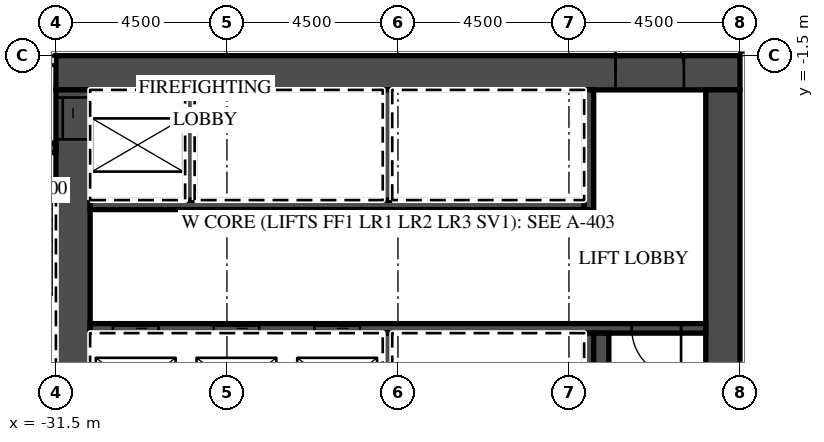
"""IFC4 building model, lengths in metres.
Left out: names, types, materials, properties, quantities, classifications, styles, units other than length and angle.
Written with IfcOpenShell. Run it as: python <this file> out.ifc"""

import sys

from ifc_helpers import new_model, si_unit, direction, frame, frame_2d, origin, place, context, subcontext, project, spatial, rectangle, extrude, element, fill, save


model = new_model("IFC4")
c1 = context("Model", 3, precision=1e-05, world=origin(), true_north=direction((0.0, 1.0)))
c2 = subcontext(c1, "Body", "Model", "MODEL_VIEW")
j1 = project(units=[si_unit("LENGTHUNIT", "METRE"), si_unit("PLANEANGLEUNIT", "RADIAN")], contexts=[c1])
p1 = place(None, origin())
s1 = spatial("IfcSite", under=j1, at=p1, CompositionType="ELEMENT")
p2 = place(p1, origin())
s2 = spatial("IfcBuilding", under=s1, at=p2, CompositionType="ELEMENT")
p3 = place(p2, frame((0.0, 0.0, 93.0)))
s3 = spatial("IfcBuildingStorey", under=s2, at=p3, CompositionType="ELEMENT", Elevation=93.0)
p4 = place(p3, frame((-13.5, -1.3, 0.0), z_axis=(0.0, 0.0, 1.0), x_axis=(1.0, 0.0, 0.0)))
e1 = element("IfcWall", 1, at=p4, inside=s3, PredefinedType="PARTITIONING", context=c2, shape_type="SweptSolid", body=[
    extrude(rectangle(XDim=58.05, YDim=0.2, at=frame_2d((29.025, 0.0))), origin(), (0.0, 0.0, 1.0), 3.02),
])
p5 = place(p4, frame((0.575, 0.0, 0.0)))
e2 = element("IfcOpeningElement", 2, at=p5, cuts=e1, PredefinedType="OPENING", context=c2, shape_type="SweptSolid", body=[
    extrude(rectangle(XDim=1.0, YDim=2.1, at=frame_2d((0.5, 1.05))), frame((0.0, 0.11, 0.0), z_axis=(0.0, -1.0, 0.0), x_axis=(1.0, 0.0, 0.0)), (0.0, 0.0, 1.0), 0.22),
])
p6 = place(p4, frame((7.45, 0.0, 0.0)))
e3 = element("IfcOpeningElement", 3, at=p6, cuts=e1, PredefinedType="OPENING", context=c2, shape_type="SweptSolid", body=[
    extrude(rectangle(XDim=1.0, YDim=2.1, at=frame_2d((0.5, 1.05))), frame((0.0, 0.11, 0.0), z_axis=(0.0, -1.0, 0.0), x_axis=(1.0, 0.0, 0.0)), (0.0, 0.0, 1.0), 0.22),
])
p7 = place(p4, frame((11.925, 0.0, 0.0)))
e4 = element("IfcOpeningElement", 4, at=p7, cuts=e1, PredefinedType="OPENING", context=c2, shape_type="SweptSolid", body=[
    extrude(rectangle(XDim=1.0, YDim=2.1, at=frame_2d((0.5, 1.05))), frame((0.0, 0.11, 0.0), z_axis=(0.0, -1.0, 0.0), x_axis=(1.0, 0.0, 0.0)), (0.0, 0.0, 1.0), 0.22),
])
p8 = place(p4, frame((14.075, 0.0, 0.0)))
e5 = element("IfcOpeningElement", 5, at=p8, cuts=e1, PredefinedType="OPENING", context=c2, shape_type="SweptSolid", body=[
    extrude(rectangle(XDim=1.0, YDim=2.1, at=frame_2d((0.5, 1.05))), frame((0.0, 0.11, 0.0), z_axis=(0.0, -1.0, 0.0), x_axis=(1.0, 0.0, 0.0)), (0.0, 0.0, 1.0), 0.22),
])
p9 = place(p4, frame((20.925, 0.0, 0.0)))
e6 = element("IfcOpeningElement", 6, at=p9, cuts=e1, PredefinedType="OPENING", context=c2, shape_type="SweptSolid", body=[
    extrude(rectangle(XDim=1.0, YDim=2.1, at=frame_2d((0.5, 1.05))), frame((0.0, 0.11, 0.0), z_axis=(0.0, -1.0, 0.0), x_axis=(1.0, 0.0, 0.0)), (0.0, 0.0, 1.0), 0.22),
])
p10 = place(p4, frame((27.862, 0.0, 0.0)))
e7 = element("IfcOpeningElement", 7, at=p10, cuts=e1, PredefinedType="OPENING", context=c2, shape_type="SweptSolid", body=[
    extrude(rectangle(XDim=1.2, YDim=2.1, at=frame_2d((0.6, 1.05))), frame((0.0, 0.11, 0.0), z_axis=(0.0, -1.0, 0.0), x_axis=(1.0, 0.0, 0.0)), (0.0, 0.0, 1.0), 0.22),
])
p11 = place(p4, frame((33.938, 0.0, 0.0)))
e8 = element("IfcOpeningElement", 8, at=p11, cuts=e1, PredefinedType="OPENING", context=c2, shape_type="SweptSolid", body=[
    extrude(rectangle(XDim=1.2, YDim=2.1, at=frame_2d((0.6, 1.05))), frame((0.0, 0.11, 0.0), z_axis=(0.0, -1.0, 0.0), x_axis=(1.0, 0.0, 0.0)), (0.0, 0.0, 1.0), 0.22),
])
p12 = place(p4, frame((45.862, 0.0, 0.0)))
e9 = element("IfcOpeningElement", 9, at=p12, cuts=e1, PredefinedType="OPENING", context=c2, shape_type="SweptSolid", body=[
    extrude(rectangle(XDim=1.2, YDim=2.1, at=frame_2d((0.6, 1.05))), frame((0.0, 0.11, 0.0), z_axis=(0.0, -1.0, 0.0), x_axis=(1.0, 0.0, 0.0)), (0.0, 0.0, 1.0), 0.22),
])
p13 = place(p4, frame((52.425, 0.0, 0.0)))
e10 = element("IfcOpeningElement", 10, at=p13, cuts=e1, PredefinedType="OPENING", context=c2, shape_type="SweptSolid", body=[
    extrude(rectangle(XDim=1.0, YDim=2.1, at=frame_2d((0.5, 1.05))), frame((0.0, 0.11, 0.0), z_axis=(0.0, -1.0, 0.0), x_axis=(1.0, 0.0, 0.0)), (0.0, 0.0, 1.0), 0.22),
])
p14 = place(p4, frame((56.525, 0.0, 0.0)))
e11 = element("IfcOpeningElement", 11, at=p14, cuts=e1, PredefinedType="OPENING", context=c2, shape_type="SweptSolid", body=[
    extrude(rectangle(XDim=1.0, YDim=2.1, at=frame_2d((0.5, 1.05))), frame((0.0, 0.11, 0.0), z_axis=(0.0, -1.0, 0.0), x_axis=(1.0, 0.0, 0.0)), (0.0, 0.0, 1.0), 0.22),
])
p15 = place(p3, frame((-31.5, -1.95, 0.0), z_axis=(0.0, 0.0, 1.0), x_axis=(1.0, 0.0, 0.0)))
e12 = element("IfcWall", 12, at=p15, inside=s3, PredefinedType="SHEAR", context=c2, shape_type="SweptSolid", body=[
    extrude(rectangle(XDim=18.0, YDim=0.9, at=frame_2d((9.0, 0.0))), origin(), (0.0, 0.0, 1.0), 3.02),
])
p16 = place(p15, frame((14.725, 0.0, 0.0)))
e13 = element("IfcOpeningElement", 13, at=p16, cuts=e12, PredefinedType="OPENING", context=c2, shape_type="SweptSolid", body=[
    extrude(rectangle(XDim=1.8, YDim=2.1, at=frame_2d((0.9, 1.05))), frame((0.0, 0.46, 0.0), z_axis=(0.0, -1.0, 0.0), x_axis=(1.0, 0.0, 0.0)), (0.0, 0.0, 1.0), 0.92),
])
p17 = place(p3, frame((-31.05, -15.2, 0.0), z_axis=(0.0, 0.0, 1.0), x_axis=(0.0, 1.0, 0.0)))
e14 = element("IfcWall", 14, at=p17, inside=s3, PredefinedType="SHEAR", context=c2, shape_type="SweptSolid", body=[
    extrude(rectangle(XDim=12.8, YDim=0.9, at=frame_2d((6.4, 0.0))), origin(), (0.0, 0.0, 1.0), 3.02),
])
p18 = place(p17, frame((11.5, 0.0, 0.0)))
e15 = element("IfcOpeningElement", 15, at=p18, cuts=e14, PredefinedType="OPENING", context=c2, shape_type="SweptSolid", body=[
    extrude(rectangle(XDim=1.1, YDim=2.1, at=frame_2d((0.55, 1.05))), frame((0.0, 0.46, 0.0), z_axis=(0.0, -1.0, 0.0), x_axis=(1.0, 0.0, 0.0)), (0.0, 0.0, 1.0), 0.92),
])
p19 = place(p3, frame((-13.95, -14.6, 0.0), z_axis=(0.0, 0.0, 1.0), x_axis=(0.0, 1.0, 0.0)))
e16 = element("IfcWall", 16, at=p19, inside=s3, PredefinedType="SHEAR", context=c2, shape_type="SweptSolid", body=[
    extrude(rectangle(XDim=12.2, YDim=0.9, at=frame_2d((6.1, 0.0))), origin(), (0.0, 0.0, 1.0), 3.02),
])
p20 = place(p3, frame((-30.6, -5.425, 0.0), z_axis=(0.0, 0.0, 1.0), x_axis=(1.0, 0.0, 0.0)))
e17 = element("IfcWall", 17, at=p20, inside=s3, PredefinedType="SHEAR", context=c2, shape_type="SweptSolid", body=[
    extrude(rectangle(XDim=13.0, YDim=0.25, at=frame_2d((6.5, 0.0))), origin(), (0.0, 0.0, 1.0), 3.02),
])
p21 = place(p3, frame((-17.475, -5.55, 0.0), z_axis=(0.0, 0.0, 1.0), x_axis=(0.0, 1.0, 0.0)))
e18 = element("IfcWall", 18, at=p21, inside=s3, PredefinedType="SHEAR", context=c2, shape_type="SweptSolid", body=[
    extrude(rectangle(XDim=3.15, YDim=0.25, at=frame_2d((1.575, 0.0))), origin(), (0.0, 0.0, 1.0), 3.02),
])
for number, where, z_axis, x_axis in (
    (19, (-27.975, -5.3, 0.0), (0.0, 0.0, 1.0), (0.0, 1.0, 0.0)),
    (20, (-22.775, -5.3, 0.0), (0.0, 0.0, 1.0), (0.0, 1.0, 0.0)),
):
    element("IfcWall", number, at=place(p3, frame(where, z_axis=z_axis, x_axis=x_axis)), inside=s3, PredefinedType="SHEAR", context=c2, shape_type="SweptSolid", body=[
        extrude(rectangle(XDim=2.9, YDim=0.25, at=frame_2d((1.45, 0.0))), origin(), (0.0, 0.0, 1.0), 3.02),
    ])
p22 = place(p3, frame((-30.6, -8.675, 0.0), z_axis=(0.0, 0.0, 1.0), x_axis=(1.0, 0.0, 0.0)))
e21 = element("IfcWall", 21, at=p22, inside=s3, PredefinedType="SHEAR", context=c2, shape_type="SweptSolid", body=[
    extrude(rectangle(XDim=16.2, YDim=0.25, at=frame_2d((8.1, 0.0))), origin(), (0.0, 0.0, 1.0), 3.02),
])
p23 = place(p22, frame((0.6, 0.0, 0.0)))
e22 = element("IfcOpeningElement", 22, at=p23, cuts=e21, PredefinedType="OPENING", context=c2, shape_type="SweptSolid", body=[
    extrude(rectangle(XDim=1.2, YDim=2.1, at=frame_2d((0.6, 1.05))), frame((0.0, 0.135, 0.0), z_axis=(0.0, -1.0, 0.0), x_axis=(1.0, 0.0, 0.0)), (0.0, 0.0, 1.0), 0.27),
])
p24 = place(p22, frame((3.25, 0.0, 0.0)))
e23 = element("IfcOpeningElement", 23, at=p24, cuts=e21, PredefinedType="OPENING", context=c2, shape_type="SweptSolid", body=[
    extrude(rectangle(XDim=1.2, YDim=2.1, at=frame_2d((0.6, 1.05))), frame((0.0, 0.135, 0.0), z_axis=(0.0, -1.0, 0.0), x_axis=(1.0, 0.0, 0.0)), (0.0, 0.0, 1.0), 0.27),
])
p25 = place(p22, frame((5.9, 0.0, 0.0)))
e24 = element("IfcOpeningElement", 24, at=p25, cuts=e21, PredefinedType="OPENING", context=c2, shape_type="SweptSolid", body=[
    extrude(rectangle(XDim=1.2, YDim=2.1, at=frame_2d((0.6, 1.05))), frame((0.0, 0.135, 0.0), z_axis=(0.0, -1.0, 0.0), x_axis=(1.0, 0.0, 0.0)), (0.0, 0.0, 1.0), 0.27),
])
p26 = place(p22, frame((14.25, 0.0, 0.0)))
e25 = element("IfcOpeningElement", 25, at=p26, cuts=e21, PredefinedType="OPENING", context=c2, shape_type="SweptSolid", body=[
    extrude(rectangle(XDim=1.3, YDim=2.1, at=frame_2d((0.65, 1.05))), frame((0.0, 0.135, 0.0), z_axis=(0.0, -1.0, 0.0), x_axis=(1.0, 0.0, 0.0)), (0.0, 0.0, 1.0), 0.27),
])
for number, where, z_axis, x_axis in (
    (26, (-17.475, -11.7, 0.0), (0.0, 0.0, 1.0), (0.0, 1.0, 0.0)),
    (27, (-22.775, -11.7, 0.0), (0.0, 0.0, 1.0), (0.0, 1.0, 0.0)),
):
    element("IfcWall", number, at=place(p3, frame(where, z_axis=z_axis, x_axis=x_axis)), inside=s3, PredefinedType="SHEAR", context=c2, shape_type="SweptSolid", body=[
        extrude(rectangle(XDim=2.9, YDim=0.25, at=frame_2d((1.45, 0.0))), origin(), (0.0, 0.0, 1.0), 3.02),
    ])
p27 = place(p3, frame((-17.15, -14.6, 0.0), z_axis=(0.0, 0.0, 1.0), x_axis=(0.0, 1.0, 0.0)))
e28 = element("IfcWall", 28, at=p27, inside=s3, PredefinedType="SHEAR", context=c2, shape_type="SweptSolid", body=[
    extrude(rectangle(XDim=5.8, YDim=0.4, at=frame_2d((2.9, 0.0))), origin(), (0.0, 0.0, 1.0), 3.02),
])
p28 = place(p3, frame((-44.55, -1.625, 0.0), z_axis=(0.0, 0.0, 1.0), x_axis=(1.0, 0.0, 0.0)))
e29 = element("IfcWall", 29, at=p28, inside=s3, PredefinedType="PARTITIONING", context=c2, shape_type="SweptSolid", body=[
    extrude(rectangle(XDim=13.05, YDim=0.25, at=frame_2d((6.525, 0.0))), origin(), (0.0, 0.0, 1.0), 3.02),
])
p29 = place(p28, frame((11.125, 0.0, 0.0)))
e30 = element("IfcOpeningElement", 30, at=p29, cuts=e29, PredefinedType="OPENING", context=c2, shape_type="SweptSolid", body=[
    extrude(rectangle(XDim=1.3, YDim=2.1, at=frame_2d((0.65, 1.05))), frame((0.0, 0.135, 0.0), z_axis=(0.0, -1.0, 0.0), x_axis=(1.0, 0.0, 0.0)), (0.0, 0.0, 1.0), 0.27),
])
p30 = place(p28, frame((8.7, 0.0, 0.0)))
e31 = element("IfcOpeningElement", 31, at=p30, cuts=e29, PredefinedType="OPENING", context=c2, shape_type="SweptSolid", body=[
    extrude(rectangle(XDim=1.1, YDim=2.1, at=frame_2d((0.55, 1.05))), frame((0.0, 0.135, 0.0), z_axis=(0.0, -1.0, 0.0), x_axis=(1.0, 0.0, 0.0)), (0.0, 0.0, 1.0), 0.27),
])
p31 = place(p3, frame((-34.05, -3.925, 0.0), z_axis=(0.0, 0.0, 1.0), x_axis=(1.0, 0.0, 0.0)))
e32 = element("IfcWall", 32, at=p31, inside=s3, PredefinedType="SHEAR", context=c2, shape_type="SweptSolid", body=[
    extrude(rectangle(XDim=2.55, YDim=0.25, at=frame_2d((1.275, 0.0))), origin(), (0.0, 0.0, 1.0), 3.02),
])
p32 = place(p31, frame((0.625, 0.0, 0.0)))
e33 = element("IfcOpeningElement", 33, at=p32, cuts=e32, PredefinedType="OPENING", context=c2, shape_type="SweptSolid", body=[
    extrude(rectangle(XDim=1.3, YDim=2.1, at=frame_2d((0.65, 1.05))), frame((0.0, 0.135, 0.0), z_axis=(0.0, -1.0, 0.0), x_axis=(1.0, 0.0, 0.0)), (0.0, 0.0, 1.0), 0.27),
])
p33 = place(p23, origin())
e34 = element("IfcDoor", 34, at=p33, inside=s3, OperationType="SLIDING_TO_LEFT", PredefinedType="DOOR", context=c2, shape_type="SweptSolid", body=[
    extrude(rectangle(XDim=1.2, YDim=2.1, at=frame_2d((0.6, 1.05))), frame((0.0, 0.025, 0.0), z_axis=(0.0, -1.0, 0.0), x_axis=(1.0, 0.0, 0.0)), (0.0, 0.0, 1.0), 0.05),
])
fill(e22, e34)
p34 = place(p24, origin())
e35 = element("IfcDoor", 35, at=p34, inside=s3, OperationType="SLIDING_TO_RIGHT", PredefinedType="DOOR", context=c2, shape_type="SweptSolid", body=[
    extrude(rectangle(XDim=1.2, YDim=2.1, at=frame_2d((0.6, 1.05))), frame((0.0, 0.025, 0.0), z_axis=(0.0, -1.0, 0.0), x_axis=(1.0, 0.0, 0.0)), (0.0, 0.0, 1.0), 0.05),
])
fill(e23, e35)
p35 = place(p25, origin())
e36 = element("IfcDoor", 36, at=p35, inside=s3, OperationType="SLIDING_TO_RIGHT", PredefinedType="DOOR", context=c2, shape_type="SweptSolid", body=[
    extrude(rectangle(XDim=1.2, YDim=2.1, at=frame_2d((0.6, 1.05))), frame((0.0, 0.025, 0.0), z_axis=(0.0, -1.0, 0.0), x_axis=(1.0, 0.0, 0.0)), (0.0, 0.0, 1.0), 0.05),
])
fill(e24, e36)
p36 = place(p18, origin())
e37 = element("IfcDoor", 37, at=p36, inside=s3, OperationType="SLIDING_TO_RIGHT", PredefinedType="DOOR", context=c2, shape_type="SweptSolid", body=[
    extrude(rectangle(XDim=1.1, YDim=2.1, at=frame_2d((0.55, 1.05))), frame((0.0, 0.025, 0.0), z_axis=(0.0, -1.0, 0.0), x_axis=(1.0, 0.0, 0.0)), (0.0, 0.0, 1.0), 0.05),
])
fill(e15, e37)
p37 = place(p16, origin())
e38 = element("IfcDoor", 38, at=p37, inside=s3, OperationType="DOUBLE_DOOR_DOUBLE_SWING", PredefinedType="DOOR", context=c2, shape_type="SweptSolid", body=[
    extrude(rectangle(XDim=1.8, YDim=2.1, at=frame_2d((0.9, 1.05))), frame((0.0, 0.025, 0.0), z_axis=(0.0, -1.0, 0.0), x_axis=(1.0, 0.0, 0.0)), (0.0, 0.0, 1.0), 0.05),
])
fill(e13, e38)
p38 = place(p26, origin())
e39 = element("IfcDoor", 39, at=p38, inside=s3, OperationType="SINGLE_SWING_RIGHT", PredefinedType="DOOR", context=c2, shape_type="SweptSolid", body=[
    extrude(rectangle(XDim=1.3, YDim=2.1, at=frame_2d((0.65, 1.05))), frame((0.0, 0.025, 0.0), z_axis=(0.0, -1.0, 0.0), x_axis=(1.0, 0.0, 0.0)), (0.0, 0.0, 1.0), 0.05),
])
fill(e25, e39)
save(model, sys.argv[1])
